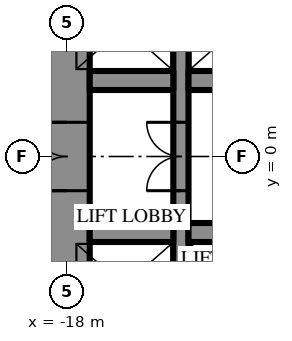
"""IFC4 building model, lengths in metres.
Left out: names, types, materials, properties, quantities, classifications, styles, units other than length and angle.
Written with IfcOpenShell. Run it as: python <this file> out.ifc"""

import sys

from ifc_helpers import new_model, si_unit, direction, frame, frame_2d, origin, place, context, subcontext, project, spatial, rectangle, extrude, element, fill, save


model = new_model("IFC4")
c1 = context("Model", 3, precision=1e-05, world=origin(), true_north=direction((0.0, 1.0)))
c2 = subcontext(c1, "Body", "Model", "MODEL_VIEW")
j1 = project(units=[si_unit("LENGTHUNIT", "METRE"), si_unit("PLANEANGLEUNIT", "RADIAN")], contexts=[c1])
p1 = place(None, origin())
s1 = spatial("IfcSite", under=j1, at=p1, CompositionType="ELEMENT")
p2 = place(p1, origin())
s2 = spatial("IfcBuilding", under=s1, at=p2, CompositionType="ELEMENT")
p3 = place(p2, frame((0.0, 0.0, 69.7)))
s3 = spatial("IfcBuildingStorey", under=s2, at=p3, CompositionType="ELEMENT", Elevation=69.7)
p4 = place(p3, frame((-18.0, 10.7, 0.0), z_axis=(0.0, 0.0, 1.0), x_axis=(0.0, -1.0, 0.0)))
e1 = element("IfcWall", 1, at=p4, inside=s3, PredefinedType="SHEAR", context=c2, shape_type="SweptSolid", body=[
    extrude(rectangle(XDim=21.4, YDim=1.2, at=frame_2d((10.7, 0.0))), origin(), (0.0, 0.0, 1.0), 4.2),
])
p5 = place(p4, frame((9.8, 0.0, 0.0)))
e2 = element("IfcOpeningElement", 2, at=p5, cuts=e1, PredefinedType="OPENING", context=c2, shape_type="SweptSolid", body=[
    extrude(rectangle(XDim=1.8, YDim=2.4, at=frame_2d((0.9, 1.2))), frame((0.0, 0.61, 0.0), z_axis=(0.0, -1.0, 0.0), x_axis=(1.0, 0.0, 0.0)), (0.0, 0.0, 1.0), 1.22),
])
p6 = place(p3, frame((-15.0, -10.7, 0.0), z_axis=(0.0, 0.0, 1.0), x_axis=(0.0, 1.0, 0.0)))
e3 = element("IfcWall", 3, at=p6, inside=s3, PredefinedType="SHEAR", context=c2, shape_type="SweptSolid", body=[
    extrude(rectangle(XDim=21.4, YDim=0.4, at=frame_2d((10.7, 0.0))), origin(), (0.0, 0.0, 1.0), 4.2),
])
p7 = place(p6, frame((9.8, 0.0, 0.0)))
e4 = element("IfcOpeningElement", 4, at=p7, cuts=e3, PredefinedType="OPENING", context=c2, shape_type="SweptSolid", body=[
    extrude(rectangle(XDim=1.8, YDim=2.4, at=frame_2d((0.9, 1.2))), frame((0.0, 0.21, 0.0), z_axis=(0.0, -1.0, 0.0), x_axis=(1.0, 0.0, 0.0)), (0.0, 0.0, 1.0), 0.42),
])
p8 = place(p3, frame((-17.4, 2.0, 0.0), z_axis=(0.0, 0.0, 1.0), x_axis=(1.0, 0.0, 0.0)))
e5 = element("IfcWall", 5, at=p8, inside=s3, PredefinedType="SHEAR", context=c2, shape_type="SweptSolid", body=[
    extrude(rectangle(XDim=2.2, YDim=0.5, at=frame_2d((1.1, 0.0))), origin(), (0.0, 0.0, 1.0), 4.2),
])
for number, where, z_axis, x_axis in (
    (6, (-14.8, 2.0, 0.0), (0.0, 0.0, 1.0), (1.0, 0.0, 0.0)),
    (7, (-12.3, -2.0, 0.0), (0.0, 0.0, 1.0), (-1.0, 0.0, 0.0)),
):
    element("IfcWall", number, at=place(p3, frame(where, z_axis=z_axis, x_axis=x_axis)), inside=s3, PredefinedType="SHEAR", context=c2, shape_type="SweptSolid", body=[
        extrude(rectangle(XDim=2.5, YDim=0.5, at=frame_2d((1.25, 0.0))), origin(), (0.0, 0.0, 1.0), 4.2),
    ])
p9 = place(p3, frame((-15.2, -2.0, 0.0), z_axis=(0.0, 0.0, 1.0), x_axis=(-1.0, 0.0, 0.0)))
e8 = element("IfcWall", 8, at=p9, inside=s3, PredefinedType="SHEAR", context=c2, shape_type="SweptSolid", body=[
    extrude(rectangle(XDim=2.2, YDim=0.5, at=frame_2d((1.1, 0.0))), origin(), (0.0, 0.0, 1.0), 4.2),
])
p10 = place(p5, frame((1.8, 0.0, 0.0), z_axis=(0.0, 0.0, 1.0), x_axis=(-1.0, 0.0, 0.0)))
e9 = element("IfcDoor", 9, at=p10, inside=s3, OperationType="DOUBLE_DOOR_SINGLE_SWING", PredefinedType="DOOR", context=c2, shape_type="SweptSolid", body=[
    extrude(rectangle(XDim=1.8, YDim=2.4, at=frame_2d((0.9, 1.2))), frame((0.0, 0.025, 0.0), z_axis=(0.0, -1.0, 0.0), x_axis=(1.0, 0.0, 0.0)), (0.0, 0.0, 1.0), 0.05),
])
fill(e2, e9)
p11 = place(p7, origin())
e10 = element("IfcDoor", 10, at=p11, inside=s3, OperationType="DOUBLE_DOOR_SINGLE_SWING", PredefinedType="DOOR", context=c2, shape_type="SweptSolid", body=[
    extrude(rectangle(XDim=1.8, YDim=2.4, at=frame_2d((0.9, 1.2))), frame((0.0, 0.025, 0.0), z_axis=(0.0, -1.0, 0.0), x_axis=(1.0, 0.0, 0.0)), (0.0, 0.0, 1.0), 0.05),
])
fill(e4, e10)
save(model, sys.argv[1])
